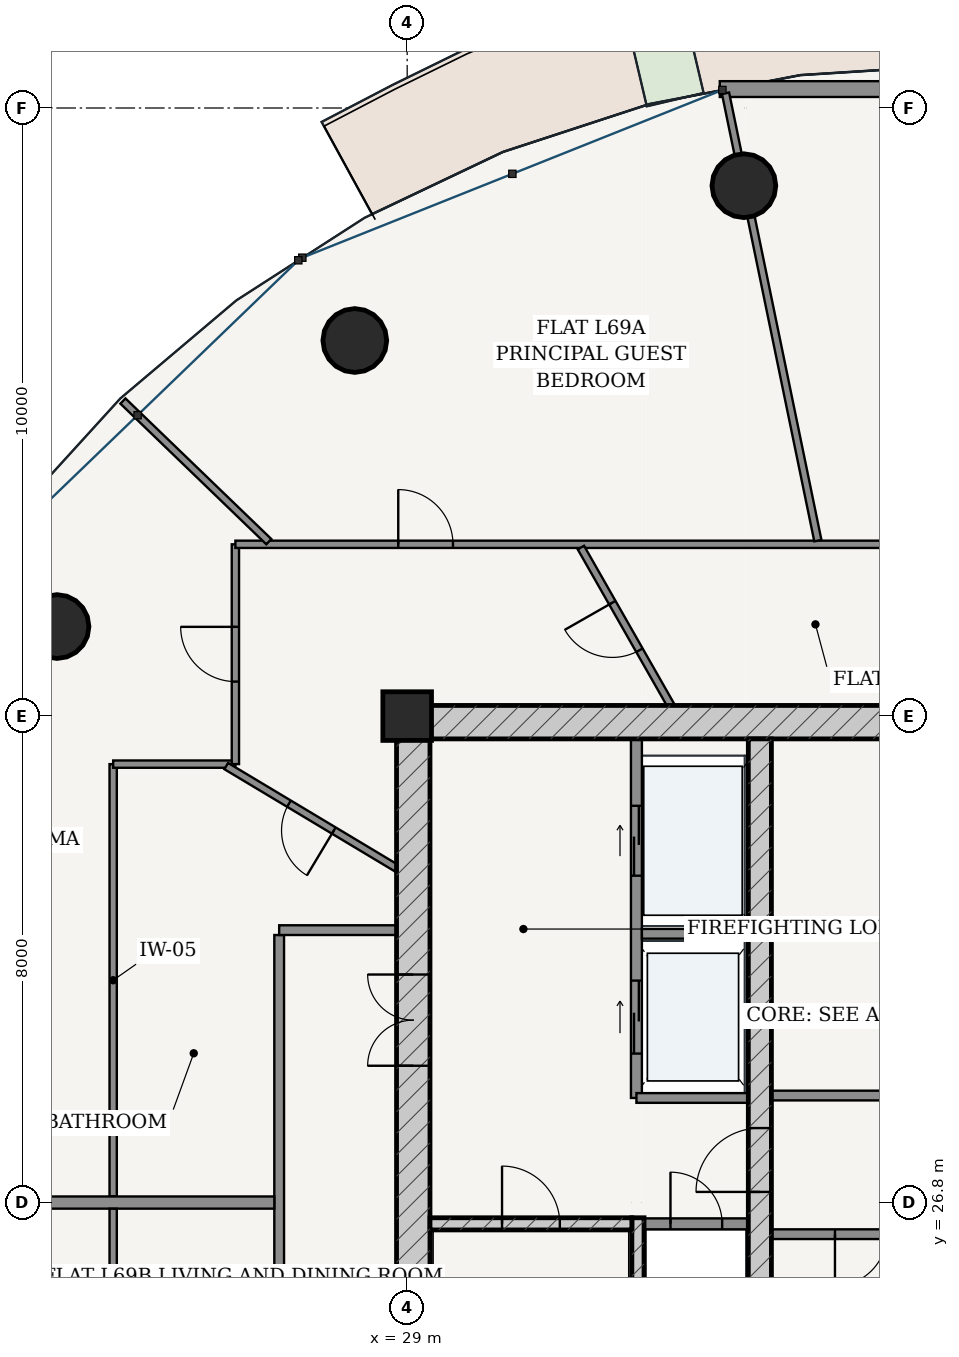
"""IFC4 building model, lengths in metres.
Left out: names, types, materials, properties, quantities, classifications, styles, units other than length and angle.
Written with IfcOpenShell. Run it as: python <this file> out.ifc"""

import sys

from ifc_helpers import new_model, si_unit, direction, frame, frame_2d, origin, origin_2d, place, context, subcontext, project, spatial, rectangle, hollow_circle, extrude, source, transform, mapped, element, fill, save


model = new_model("IFC4")
c1 = context("Model", 3, precision=1e-05, world=origin(), true_north=direction((-0.2419218956, 0.970295726276)))
c2 = subcontext(c1, "Body", "Model", "MODEL_VIEW")
j1 = project(units=[si_unit("LENGTHUNIT", "METRE"), si_unit("PLANEANGLEUNIT", "RADIAN")], contexts=[c1])
p1 = place(None, origin())
s1 = spatial("IfcSite", under=j1, at=p1, CompositionType="ELEMENT")
p2 = place(p1, origin())
s2 = spatial("IfcBuilding", under=s1, at=p2, CompositionType="ELEMENT")
p3 = place(p2, frame((0.0, 0.0, 263.2)))
s3 = spatial("IfcBuildingStorey", under=s2, at=p3, CompositionType="ELEMENT", Elevation=263.2)
p4 = place(p3, frame((29.0, 34.8, 0.0), z_axis=(0.0, 0.0, 1.0), x_axis=(1.0, 0.0, 0.0)))
e1 = element("IfcColumn", 1, at=p4, inside=s3, PredefinedType="COLUMN", context=c2, shape_type="SweptSolid", body=[
    extrude(rectangle(XDim=0.8, YDim=0.8, at=origin_2d()), origin(), (0.0, 0.0, 1.0), 3.75),
])
p5 = place(p3, frame((28.825, 34.7, 0.0), z_axis=(0.0, 0.0, 1.0), x_axis=(1.0, 0.0, 0.0)))
e2 = element("IfcWall", 2, at=p5, inside=s3, PredefinedType="SHEAR", context=c2, shape_type="SweptSolid", body=[
    extrude(rectangle(XDim=18.35, YDim=0.55, at=frame_2d((9.175, 0.0))), origin(), (0.0, 0.0, 1.0), 3.49),
])
p6 = place(p3, frame((29.1, 19.175, 0.0), z_axis=(0.0, 0.0, 1.0), x_axis=(0.0, 1.0, 0.0)))
e3 = element("IfcWall", 3, at=p6, inside=s3, PredefinedType="SHEAR", context=c2, shape_type="SweptSolid", body=[
    extrude(rectangle(XDim=15.25, YDim=0.55, at=frame_2d((7.625, 0.0))), origin(), (0.0, 0.0, 1.0), 3.49),
])
p7 = place(p6, frame((9.875, 0.0, 0.0)))
e4 = element("IfcOpeningElement", 4, at=p7, cuts=e3, PredefinedType="OPENING", context=c2, shape_type="SweptSolid", body=[
    extrude(rectangle(XDim=1.5, YDim=2.2, at=frame_2d((0.75, 1.1))), frame((0.0, 0.285, 0.0), z_axis=(0.0, -1.0, 0.0), x_axis=(1.0, 0.0, 0.0)), (0.0, 0.0, 1.0), 0.57),
])
p8 = place(p3, frame((32.795, 19.175, 0.0), z_axis=(0.0, 0.0, 1.0), x_axis=(0.0, 1.0, 0.0)))
e5 = element("IfcWall", 5, at=p8, inside=s3, PredefinedType="SOLIDWALL", context=c2, shape_type="SweptSolid", body=[
    extrude(rectangle(XDim=7.375, YDim=0.2, at=frame_2d((3.688, 0.0))), origin(), (0.0, 0.0, 1.0), 3.49),
])
p9 = place(p3, frame((29.375, 26.45, 0.0), z_axis=(0.0, 0.0, 1.0), x_axis=(1.0, 0.0, 0.0)))
e6 = element("IfcWall", 6, at=p9, inside=s3, PredefinedType="SOLIDWALL", context=c2, shape_type="SweptSolid", body=[
    extrude(rectangle(XDim=3.32, YDim=0.2, at=frame_2d((1.66, 0.0))), origin(), (0.0, 0.0, 1.0), 3.49),
])
p10 = place(p9, frame((1.185, 0.0, 0.0)))
e7 = element("IfcOpeningElement", 7, at=p10, cuts=e6, PredefinedType="OPENING", context=c2, shape_type="SweptSolid", body=[
    extrude(rectangle(XDim=0.95, YDim=2.15, at=frame_2d((0.475, 1.075))), frame((0.0, 0.11, 0.0), z_axis=(0.0, -1.0, 0.0), x_axis=(1.0, 0.0, 0.0)), (0.0, 0.0, 1.0), 0.22),
])
p11 = place(p3, frame((34.8, 19.175, 0.0), z_axis=(0.0, 0.0, 1.0), x_axis=(0.0, 1.0, 0.0)))
e8 = element("IfcWall", 8, at=p11, inside=s3, PredefinedType="SHEAR", context=c2, shape_type="SweptSolid", body=[
    extrude(rectangle(XDim=15.25, YDim=0.38, at=frame_2d((7.625, 0.0))), origin(), (0.0, 0.0, 1.0), 3.49),
])
p12 = place(p11, frame((7.8, 0.0, 0.0)))
e9 = element("IfcOpeningElement", 9, at=p12, cuts=e8, PredefinedType="OPENING", context=c2, shape_type="SweptSolid", body=[
    extrude(rectangle(XDim=1.05, YDim=2.15, at=frame_2d((0.525, 1.075))), frame((0.0, 0.2, 0.0), z_axis=(0.0, -1.0, 0.0), x_axis=(1.0, 0.0, 0.0)), (0.0, 0.0, 1.0), 0.4),
])
for number, where, z_axis, x_axis in (
    (10, (34.537, 43.522, 0.0), (0.0, 0.0, 1.0), (1.0, 0.0, 0.0)),
    (11, (28.139, 40.977, 0.0), (0.0, 0.0, 1.0), (1.0, 0.0, 0.0)),
    (12, (23.241, 36.272, 0.0), (0.0, 0.0, 1.0), (1.0, 0.0, 0.0)),
):
    element("IfcColumn", number, at=place(p3, frame(where, z_axis=z_axis, x_axis=x_axis)), inside=s3, PredefinedType="COLUMN", context=c2, shape_type="SweptSolid", body=[
        extrude(hollow_circle(Radius=0.525, WallThickness=0.035, at=origin_2d()), origin(), (0.0, 0.0, 1.0), 3.75),
    ])
p13 = place(p3, frame((41.859, 45.111, 0.0), z_axis=(0.0, 0.0, 1.0), x_axis=(-1.0, 0.0, 0.0)))
e13 = element("IfcWall", 13, at=p13, inside=s3, PredefinedType="SOLIDWALL", context=c2, shape_type="SweptSolid", body=[
    extrude(rectangle(XDim=7.718, YDim=0.26, at=frame_2d((3.859, 0.0))), origin(), (0.0, 0.0, 1.0), 3.49),
])
p14 = place(p13, frame((3.184, 0.0, 0.0)))
e14 = element("IfcOpeningElement", 14, at=p14, cuts=e13, PredefinedType="OPENING", context=c2, shape_type="SweptSolid", body=[
    extrude(rectangle(XDim=1.35, YDim=2.2, at=frame_2d((0.675, 1.1))), frame((0.0, 0.14, 0.0), z_axis=(0.0, -1.0, 0.0), x_axis=(1.0, 0.0, 0.0)), (0.0, 0.0, 1.0), 0.28),
])
p15 = place(p3, frame((32.9, 26.45, 0.0), z_axis=(0.0, 0.0, 1.0), x_axis=(1.0, 0.0, 0.0)))
e15 = element("IfcWall", 15, at=p15, inside=s3, PredefinedType="PARTITIONING", context=c2, shape_type="SweptSolid", body=[
    extrude(rectangle(XDim=1.71, YDim=0.18, at=frame_2d((0.855, 0.0))), origin(), (0.0, 0.0, 1.0), 3.49),
])
p16 = place(p15, frame((0.43, 0.0, 0.0)))
e16 = element("IfcOpeningElement", 16, at=p16, cuts=e15, PredefinedType="OPENING", context=c2, shape_type="SweptSolid", body=[
    extrude(rectangle(XDim=0.85, YDim=2.1, at=frame_2d((0.425, 1.05))), frame((0.0, 0.1, 0.0), z_axis=(0.0, -1.0, 0.0), x_axis=(1.0, 0.0, 0.0)), (0.0, 0.0, 1.0), 0.2),
])
p17 = place(p3, frame((32.77, 28.52, 0.0), z_axis=(0.0, 0.0, 1.0), x_axis=(0.0, 1.0, 0.0)))
e17 = element("IfcWall", 17, at=p17, inside=s3, PredefinedType="PARTITIONING", context=c2, shape_type="SweptSolid", body=[
    extrude(rectangle(XDim=5.905, YDim=0.18, at=frame_2d((2.953, 0.0))), origin(), (0.0, 0.0, 1.0), 3.49),
])
p18 = place(p17, frame((3.655, 0.0, 0.0)))
e18 = element("IfcOpeningElement", 18, at=p18, cuts=e17, PredefinedType="OPENING", context=c2, shape_type="SweptSolid", body=[
    extrude(rectangle(XDim=1.15, YDim=2.2, at=frame_2d((0.575, 1.1))), frame((0.0, 0.1, 0.0), z_axis=(0.0, -1.0, 0.0), x_axis=(1.0, 0.0, 0.0)), (0.0, 0.0, 1.0), 0.2),
])
p19 = place(p17, frame((0.73, 0.0, 0.0)))
e19 = element("IfcOpeningElement", 19, at=p19, cuts=e17, PredefinedType="OPENING", context=c2, shape_type="SweptSolid", body=[
    extrude(rectangle(XDim=1.2, YDim=2.25, at=frame_2d((0.6, 1.125))), frame((0.0, 0.1, 0.0), z_axis=(0.0, -1.0, 0.0), x_axis=(1.0, 0.0, 0.0)), (0.0, 0.0, 1.0), 0.2),
])
p20 = place(p3, frame((32.86, 31.22, 0.0), z_axis=(0.0, 0.0, 1.0), x_axis=(1.0, 0.0, 0.0)))
e20 = element("IfcWall", 20, at=p20, inside=s3, PredefinedType="PARTITIONING", context=c2, shape_type="SweptSolid", body=[
    extrude(rectangle(XDim=1.75, YDim=0.16, at=frame_2d((0.875, 0.0))), origin(), (0.0, 0.0, 1.0), 3.49),
])
p21 = place(p3, frame((32.77, 28.52, 0.0), z_axis=(0.0, 0.0, 1.0), x_axis=(1.0, 0.0, 0.0)))
e21 = element("IfcWall", 21, at=p21, inside=s3, PredefinedType="PARTITIONING", context=c2, shape_type="SweptSolid", body=[
    extrude(rectangle(XDim=1.84, YDim=0.16, at=frame_2d((0.92, 0.0))), origin(), (0.0, 0.0, 1.0), 3.49),
])
p22 = place(p3, frame((34.99, 28.56, 0.0), z_axis=(0.0, 0.0, 1.0), x_axis=(1.0, 0.0, 0.0)))
e22 = element("IfcWall", 22, at=p22, inside=s3, PredefinedType="PARTITIONING", context=c2, shape_type="SweptSolid", body=[
    extrude(rectangle(XDim=6.02, YDim=0.16, at=frame_2d((3.01, 0.0))), origin(), (0.0, 0.0, 1.0), 3.49),
])
p23 = place(p22, frame((2.585, 0.0, 0.0)))
e23 = element("IfcOpeningElement", 23, at=p23, cuts=e22, PredefinedType="OPENING", context=c2, shape_type="SweptSolid", body=[
    extrude(rectangle(XDim=0.85, YDim=2.1, at=frame_2d((0.425, 1.05))), frame((0.0, 0.09, 0.0), z_axis=(0.0, -1.0, 0.0), x_axis=(1.0, 0.0, 0.0)), (0.0, 0.0, 1.0), 0.18),
])
p24 = place(p3, frame((34.99, 26.28, 0.0), z_axis=(0.0, 0.0, 1.0), x_axis=(1.0, 0.0, 0.0)))
e24 = element("IfcWall", 24, at=p24, inside=s3, PredefinedType="PARTITIONING", context=c2, shape_type="SweptSolid", body=[
    extrude(rectangle(XDim=6.02, YDim=0.16, at=frame_2d((3.01, 0.0))), origin(), (0.0, 0.0, 1.0), 3.49),
])
p25 = place(p24, frame((1.045, 0.0, 0.0)))
e25 = element("IfcOpeningElement", 25, at=p25, cuts=e24, PredefinedType="OPENING", context=c2, shape_type="SweptSolid", body=[
    extrude(rectangle(XDim=0.85, YDim=2.1, at=frame_2d((0.425, 1.05))), frame((0.0, 0.09, 0.0), z_axis=(0.0, -1.0, 0.0), x_axis=(1.0, 0.0, 0.0)), (0.0, 0.0, 1.0), 0.18),
])
p26 = place(p24, frame((3.215, 0.0, 0.0)))
e26 = element("IfcOpeningElement", 26, at=p26, cuts=e24, PredefinedType="OPENING", context=c2, shape_type="SweptSolid", body=[
    extrude(rectangle(XDim=1.1, YDim=2.2, at=frame_2d((0.55, 1.1))), frame((0.0, 0.09, 0.0), z_axis=(0.0, -1.0, 0.0), x_axis=(1.0, 0.0, 0.0)), (0.0, 0.0, 1.0), 0.18),
])
p27 = place(p24, frame((4.695, 0.0, 0.0)))
e27 = element("IfcOpeningElement", 27, at=p27, cuts=e24, PredefinedType="OPENING", context=c2, shape_type="SweptSolid", body=[
    extrude(rectangle(XDim=1.1, YDim=2.2, at=frame_2d((0.55, 1.1))), frame((0.0, 0.09, 0.0), z_axis=(0.0, -1.0, 0.0), x_axis=(1.0, 0.0, 0.0)), (0.0, 0.0, 1.0), 0.18),
])
p28 = place(p3, frame((26.895, 17.275, 0.0), z_axis=(0.0, 0.0, 1.0), x_axis=(0.0, 1.0, 0.0)))
e28 = element("IfcWall", 28, at=p28, inside=s3, PredefinedType="PARTITIONING", context=c2, shape_type="SweptSolid", body=[
    extrude(rectangle(XDim=13.925, YDim=0.16, at=frame_2d((6.962, 0.0))), origin(), (0.0, 0.0, 1.0), 3.015),
])
p29 = place(p28, frame((1.992, 0.0, 0.0)))
e29 = element("IfcOpeningElement", 29, at=p29, cuts=e28, PredefinedType="OPENING", context=c2, shape_type="SweptSolid", body=[
    extrude(rectangle(XDim=0.98, YDim=2.2, at=frame_2d((0.49, 1.1))), frame((0.0, 0.09, 0.0), z_axis=(0.0, -1.0, 0.0), x_axis=(1.0, 0.0, 0.0)), (0.0, 0.0, 1.0), 0.18),
])
p30 = place(p3, frame((26.895, 31.28, 0.0), z_axis=(0.0, 0.0, 1.0), x_axis=(1.0, 0.0, 0.0)))
e30 = element("IfcWall", 30, at=p30, inside=s3, PredefinedType="PARTITIONING", context=c2, shape_type="SweptSolid", body=[
    extrude(rectangle(XDim=1.93, YDim=0.16, at=frame_2d((0.965, 0.0))), origin(), (0.0, 0.0, 1.0), 3.49),
])
p31 = place(p3, frame((24.165, 26.902, 0.0), z_axis=(0.0, 0.0, 1.0), x_axis=(0.0, 1.0, 0.0)))
e31 = element("IfcWall", 31, at=p31, inside=s3, PredefinedType="PARTITIONING", context=c2, shape_type="SweptSolid", body=[
    extrude(rectangle(XDim=7.108, YDim=0.12, at=frame_2d((3.554, 0.0))), origin(), (0.0, 0.0, 1.0), 3.015),
])
p32 = place(p3, frame((24.165, 34.01, 0.0), z_axis=(0.0, 0.0, 1.0), x_axis=(1.0, 0.0, 0.0)))
e32 = element("IfcWall", 32, at=p32, inside=s3, PredefinedType="PARTITIONING", context=c2, shape_type="SweptSolid", body=[
    extrude(rectangle(XDim=2.01, YDim=0.12, at=frame_2d((1.005, 0.0))), origin(), (0.0, 0.0, 1.0), 3.209),
])
p33 = place(p3, frame((26.175, 34.01, 0.0), z_axis=(0.0, 0.0, 1.0), x_axis=(0.0, 1.0, 0.0)))
e33 = element("IfcWall", 33, at=p33, inside=s3, PredefinedType="PARTITIONING", context=c2, shape_type="SweptSolid", body=[
    extrude(rectangle(XDim=3.615, YDim=0.12, at=frame_2d((1.808, 0.0))), origin(), (0.0, 0.0, 1.0), 3.015),
])
p34 = place(p33, frame((1.357, 0.0, 0.0)))
e34 = element("IfcOpeningElement", 34, at=p34, cuts=e33, PredefinedType="OPENING", context=c2, shape_type="SweptSolid", body=[
    extrude(rectangle(XDim=0.9, YDim=2.15, at=frame_2d((0.45, 1.075))), frame((0.0, 0.07, 0.0), z_axis=(0.0, -1.0, 0.0), x_axis=(1.0, 0.0, 0.0)), (0.0, 0.0, 1.0), 0.14),
])
p35 = place(p3, frame((26.175, 37.625, 0.0), z_axis=(0.0, 0.0, 1.0), x_axis=(1.0, 0.0, 0.0)))
e35 = element("IfcWall", 35, at=p35, inside=s3, PredefinedType="PARTITIONING", context=c2, shape_type="SweptSolid", body=[
    extrude(rectangle(XDim=23.65, YDim=0.12, at=frame_2d((11.825, 0.0))), origin(), (0.0, 0.0, 1.0), 3.015),
])
p36 = place(p35, frame((14.733, 0.0, 0.0)))
e36 = element("IfcOpeningElement", 36, at=p36, cuts=e35, PredefinedType="OPENING", context=c2, shape_type="SweptSolid", body=[
    extrude(rectangle(XDim=0.9, YDim=2.15, at=frame_2d((0.45, 1.075))), frame((0.0, 0.07, 0.0), z_axis=(0.0, -1.0, 0.0), x_axis=(1.0, 0.0, 0.0)), (0.0, 0.0, 1.0), 0.14),
])
p37 = place(p35, frame((11.279, 0.0, 0.0)))
e37 = element("IfcOpeningElement", 37, at=p37, cuts=e35, PredefinedType="OPENING", context=c2, shape_type="SweptSolid", body=[
    extrude(rectangle(XDim=0.9, YDim=2.15, at=frame_2d((0.45, 1.075))), frame((0.0, 0.07, 0.0), z_axis=(0.0, -1.0, 0.0), x_axis=(1.0, 0.0, 0.0)), (0.0, 0.0, 1.0), 0.14),
])
p38 = place(p35, frame((2.678, 0.0, 0.0)))
e38 = element("IfcOpeningElement", 38, at=p38, cuts=e35, PredefinedType="OPENING", context=c2, shape_type="SweptSolid", body=[
    extrude(rectangle(XDim=0.9, YDim=2.15, at=frame_2d((0.45, 1.075))), frame((0.0, 0.07, 0.0), z_axis=(0.0, -1.0, 0.0), x_axis=(1.0, 0.0, 0.0)), (0.0, 0.0, 1.0), 0.14),
])
p39 = place(p3, frame((35.754, 37.686, 0.0), z_axis=(0.0, 0.0, 1.0), x_axis=(-0.202105877204, 0.979363678313, 0.0)))
e39 = element("IfcWall", 39, at=p39, inside=s3, PredefinedType="PARTITIONING", context=c2, shape_type="SweptSolid", body=[
    extrude(rectangle(XDim=7.512, YDim=0.12, at=frame_2d((3.756, 0.0))), origin(), (0.0, 0.0, 1.0), 3.015),
])
p40 = place(p3, frame((26.725, 37.668, 0.0), z_axis=(0.0, 0.0, 1.0), x_axis=(-0.719954096891, 0.694021684366, 0.0)))
e40 = element("IfcWall", 40, at=p40, inside=s3, PredefinedType="PARTITIONING", context=c2, shape_type="SweptSolid", body=[
    extrude(rectangle(XDim=3.333, YDim=0.12, at=frame_2d((1.667, 0.0))), origin(), (0.0, 0.0, 1.0), 3.121),
])
p41 = place(p3, frame((33.336, 34.977, 0.0), z_axis=(0.0, 0.0, 1.0), x_axis=(-0.495399243909, 0.868665406894, 0.0)))
e41 = element("IfcWall", 41, at=p41, inside=s3, PredefinedType="PARTITIONING", context=c2, shape_type="SweptSolid", body=[
    extrude(rectangle(XDim=2.987, YDim=0.12, at=frame_2d((1.493, 0.0))), origin(), (0.0, 0.0, 1.0), 3.49),
])
p42 = place(p41, frame((1.043, 0.0, 0.0)))
e42 = element("IfcOpeningElement", 42, at=p42, cuts=e41, PredefinedType="OPENING", context=c2, shape_type="SweptSolid", body=[
    extrude(rectangle(XDim=0.9, YDim=2.15, at=frame_2d((0.45, 1.075))), frame((0.0, 0.07, 0.0), z_axis=(0.0, -1.0, 0.0), x_axis=(1.0, 0.0, 0.0)), (0.0, 0.0, 1.0), 0.14),
])
p43 = place(p3, frame((28.825, 32.3, 0.0), z_axis=(0.0, 0.0, 1.0), x_axis=(-0.857743539935, 0.514077834282, 0.0)))
e43 = element("IfcWall", 43, at=p43, inside=s3, PredefinedType="PARTITIONING", context=c2, shape_type="SweptSolid", body=[
    extrude(rectangle(XDim=3.265, YDim=0.12, at=frame_2d((1.632, 0.0))), origin(), (0.0, 0.0, 1.0), 3.49),
])
p44 = place(p43, frame((1.202, 0.0, 0.0)))
e44 = element("IfcOpeningElement", 44, at=p44, cuts=e43, PredefinedType="OPENING", context=c2, shape_type="SweptSolid", body=[
    extrude(rectangle(XDim=0.86, YDim=2.15, at=frame_2d((0.43, 1.075))), frame((0.0, 0.07, 0.0), z_axis=(0.0, -1.0, 0.0), x_axis=(1.0, 0.0, 0.0)), (0.0, 0.0, 1.0), 0.14),
])
p45 = place(p3, frame((26.815, 26.8, 0.0), z_axis=(0.0, 0.0, 1.0), x_axis=(-1.0, 0.0, 0.0)))
e45 = element("IfcWall", 45, at=p45, inside=s3, PredefinedType="PARTITIONING", context=c2, shape_type="SweptSolid", body=[
    extrude(rectangle(XDim=8.155, YDim=0.2, at=frame_2d((4.078, 0.0))), origin(), (0.0, 0.0, 1.0), 3.121),
])
p46 = place(p3, frame((24.165, 14.465, 0.0), z_axis=(0.0, 0.0, 1.0), x_axis=(0.0, 1.0, 0.0)))
e46 = element("IfcWall", 46, at=p46, inside=s3, PredefinedType="PARTITIONING", context=c2, shape_type="SweptSolid", body=[
    extrude(rectangle(XDim=12.233, YDim=0.12, at=frame_2d((6.116, 0.0))), origin(), (0.0, 0.0, 1.0), 3.015),
])
p47 = place(p46, frame((3.863, 0.0, 0.0)))
e47 = element("IfcOpeningElement", 47, at=p47, cuts=e46, PredefinedType="OPENING", context=c2, shape_type="SweptSolid", body=[
    extrude(rectangle(XDim=0.9, YDim=2.15, at=frame_2d((0.45, 1.075))), frame((0.0, 0.07, 0.0), z_axis=(0.0, -1.0, 0.0), x_axis=(1.0, 0.0, 0.0)), (0.0, 0.0, 1.0), 0.14),
])
m1 = source(origin(), c2, "Body", "SweptSolid", [
    extrude(rectangle(XDim=1.5, YDim=2.2, at=frame_2d((0.75, 1.1))), frame((0.0, 0.025, 0.0), z_axis=(0.0, -1.0, 0.0), x_axis=(1.0, 0.0, 0.0)), (0.0, 0.0, 1.0), 0.05),
])
p48 = place(p7, origin())
e48 = element("IfcDoor", 48, at=p48, inside=s3, OperationType="DOUBLE_DOOR_SINGLE_SWING", PredefinedType="DOOR", context=c2, shape_type="MappedRepresentation", body=[
    mapped(m1, transform((0.0, 0.0, 0.0), scale=1.0)),
])
fill(e4, e48)
m2 = source(origin(), c2, "Body", "SweptSolid", [
    extrude(rectangle(XDim=1.05, YDim=2.15, at=frame_2d((0.525, 1.075))), frame((0.0, 0.025, 0.0), z_axis=(0.0, -1.0, 0.0), x_axis=(1.0, 0.0, 0.0)), (0.0, 0.0, 1.0), 0.05),
])
p49 = place(p12, origin())
e49 = element("IfcDoor", 49, at=p49, inside=s3, OperationType="SINGLE_SWING_LEFT", PredefinedType="DOOR", context=c2, shape_type="MappedRepresentation", body=[
    mapped(m2, transform((0.0, 0.0, 0.0), scale=1.0)),
])
fill(e9, e49)
m3 = source(origin(), c2, "Body", "SweptSolid", [
    extrude(rectangle(XDim=0.95, YDim=2.15, at=frame_2d((0.475, 1.075))), frame((0.0, 0.025, 0.0), z_axis=(0.0, -1.0, 0.0), x_axis=(1.0, 0.0, 0.0)), (0.0, 0.0, 1.0), 0.05),
])
p50 = place(p10, origin())
e50 = element("IfcDoor", 50, at=p50, inside=s3, OperationType="SINGLE_SWING_LEFT", PredefinedType="DOOR", context=c2, shape_type="MappedRepresentation", body=[
    mapped(m3, transform((0.0, 0.0, 0.0), scale=1.0)),
])
fill(e7, e50)
m4 = source(origin(), c2, "Body", "SweptSolid", [
    extrude(rectangle(XDim=0.85, YDim=2.1, at=frame_2d((0.425, 1.05))), frame((0.0, 0.025, 0.0), z_axis=(0.0, -1.0, 0.0), x_axis=(1.0, 0.0, 0.0)), (0.0, 0.0, 1.0), 0.05),
])
p51 = place(p16, origin())
e51 = element("IfcDoor", 51, at=p51, inside=s3, OperationType="SINGLE_SWING_LEFT", PredefinedType="DOOR", context=c2, shape_type="MappedRepresentation", body=[
    mapped(m4, transform((0.0, 0.0, 0.0), scale=1.0)),
])
fill(e16, e51)
p52 = place(p25, frame((0.85, 0.0, 0.0), z_axis=(0.0, 0.0, 1.0), x_axis=(-1.0, 0.0, 0.0)))
e52 = element("IfcDoor", 52, at=p52, inside=s3, OperationType="SINGLE_SWING_RIGHT", PredefinedType="DOOR", context=c2, shape_type="MappedRepresentation", body=[
    mapped(m4, transform((0.0, 0.0, 0.0), scale=1.0)),
])
fill(e25, e52)
m5 = source(origin(), c2, "Body", "SweptSolid", [
    extrude(rectangle(XDim=1.15, YDim=2.2, at=frame_2d((0.575, 1.1))), frame((0.0, 0.025, 0.0), z_axis=(0.0, -1.0, 0.0), x_axis=(1.0, 0.0, 0.0)), (0.0, 0.0, 1.0), 0.05),
])
p53 = place(p18, origin())
e53 = element("IfcDoor", 53, at=p53, inside=s3, OperationType="DOUBLE_DOOR_SLIDING", PredefinedType="DOOR", context=c2, shape_type="MappedRepresentation", body=[
    mapped(m5, transform((0.0, 0.0, 0.0), scale=1.0)),
])
fill(e18, e53)
m6 = source(origin(), c2, "Body", "SweptSolid", [
    extrude(rectangle(XDim=1.2, YDim=2.25, at=frame_2d((0.6, 1.125))), frame((0.0, 0.025, 0.0), z_axis=(0.0, -1.0, 0.0), x_axis=(1.0, 0.0, 0.0)), (0.0, 0.0, 1.0), 0.05),
])
p54 = place(p19, origin())
e54 = element("IfcDoor", 54, at=p54, inside=s3, OperationType="DOUBLE_DOOR_SLIDING", PredefinedType="DOOR", context=c2, shape_type="MappedRepresentation", body=[
    mapped(m6, transform((0.0, 0.0, 0.0), scale=1.0)),
])
fill(e19, e54)
m7 = source(origin(), c2, "Body", "SweptSolid", [
    extrude(rectangle(XDim=0.9, YDim=2.15, at=frame_2d((0.45, 1.075))), frame((0.0, 0.025, 0.0), z_axis=(0.0, -1.0, 0.0), x_axis=(1.0, 0.0, 0.0)), (0.0, 0.0, 1.0), 0.05),
])
p55 = place(p42, origin())
e55 = element("IfcDoor", 55, at=p55, inside=s3, OperationType="SINGLE_SWING_RIGHT", PredefinedType="DOOR", context=c2, shape_type="MappedRepresentation", body=[
    mapped(m7, transform((0.0, 0.0, 0.0), scale=1.0)),
])
fill(e42, e55)
m8 = source(origin(), c2, "Body", "SweptSolid", [
    extrude(rectangle(XDim=0.86, YDim=2.15, at=frame_2d((0.43, 1.075))), frame((0.0, 0.025, 0.0), z_axis=(0.0, -1.0, 0.0), x_axis=(1.0, 0.0, 0.0)), (0.0, 0.0, 1.0), 0.05),
])
p56 = place(p44, origin())
e56 = element("IfcDoor", 56, at=p56, inside=s3, OperationType="SINGLE_SWING_LEFT", PredefinedType="DOOR", context=c2, shape_type="MappedRepresentation", body=[
    mapped(m8, transform((0.0, 0.0, 0.0), scale=1.0)),
])
fill(e44, e56)
p57 = place(p38, origin())
e57 = element("IfcDoor", 57, at=p57, inside=s3, OperationType="SINGLE_SWING_LEFT", PredefinedType="DOOR", context=c2, shape_type="MappedRepresentation", body=[
    mapped(m7, transform((0.0, 0.0, 0.0), scale=1.0)),
])
fill(e38, e57)
p58 = place(p34, origin())
e58 = element("IfcDoor", 58, at=p58, inside=s3, OperationType="SINGLE_SWING_RIGHT", PredefinedType="DOOR", context=c2, shape_type="MappedRepresentation", body=[
    mapped(m7, transform((0.0, 0.0, 0.0), scale=1.0)),
])
fill(e34, e58)
save(model, sys.argv[1])
